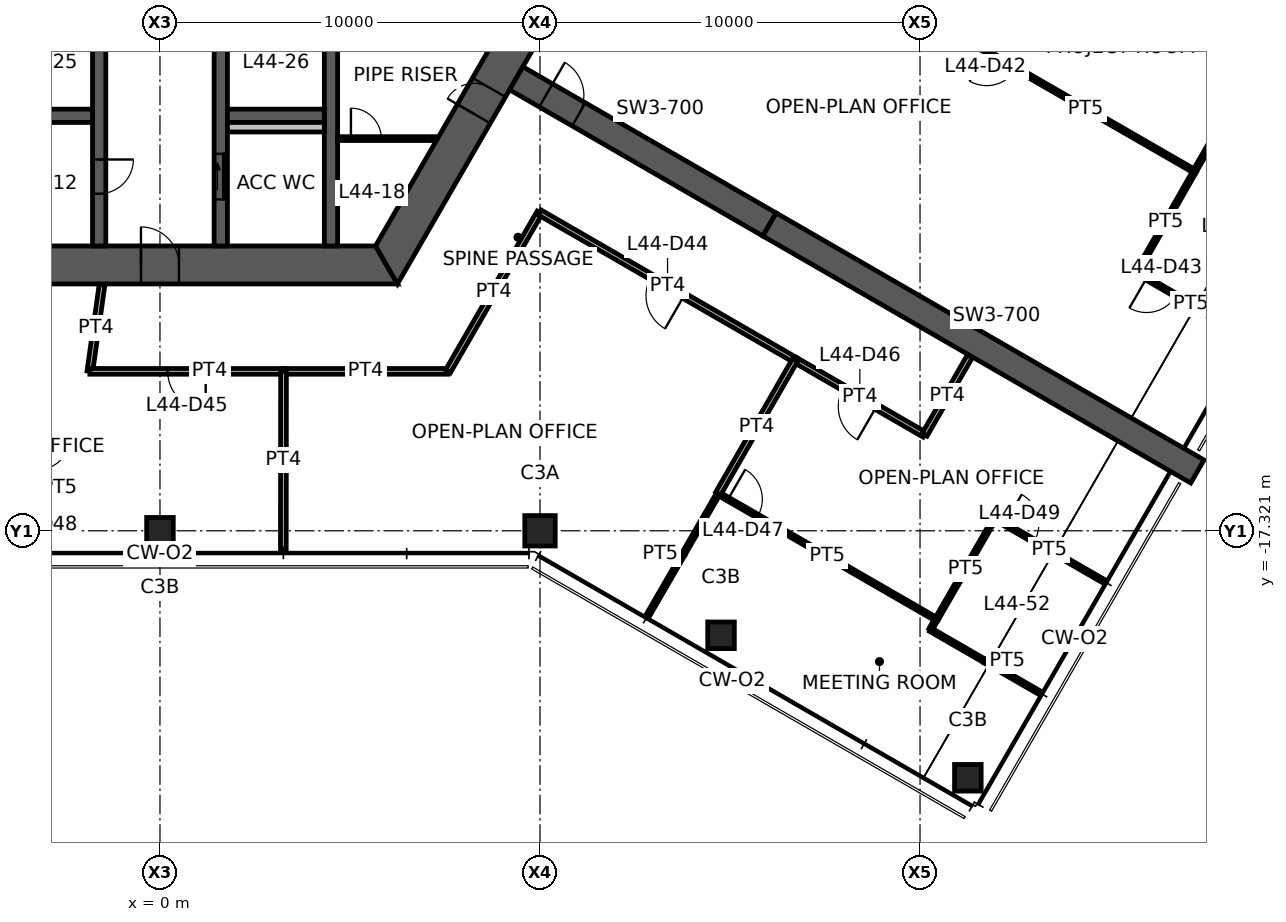
"""IFC4 building model, lengths in metres.
Left out: names, types, materials, properties, quantities, classifications, styles, units other than length and angle.
Written with IfcOpenShell. Run it as: python <this file> out.ifc"""

import sys

from ifc_helpers import new_model, si_unit, direction, frame, frame_2d, origin, origin_2d, place, context, subcontext, project, spatial, polyline, rectangle, hollow_rectangle, outline, extrude, element, fill, save


model = new_model("IFC4")
c1 = context("Model", 3, precision=1e-05, world=origin(), true_north=direction((0.0, 1.0)))
c2 = subcontext(c1, "Body", "Model", "MODEL_VIEW")
j1 = project(units=[si_unit("LENGTHUNIT", "METRE"), si_unit("PLANEANGLEUNIT", "RADIAN")], contexts=[c1])
p1 = place(None, origin())
s1 = spatial("IfcSite", under=j1, at=p1, CompositionType="ELEMENT")
p2 = place(p1, origin())
s2 = spatial("IfcBuilding", under=s1, at=p2, CompositionType="ELEMENT")
p3 = place(p2, frame((0.0, 0.0, 176.0)))
s3 = spatial("IfcBuildingStorey", under=s2, at=p3, CompositionType="ELEMENT", Elevation=176.0)
p4 = place(p3, frame((10.0, -17.321, 0.0), z_axis=(0.0, 0.0, 1.0), x_axis=(1.0, 0.0, 0.0)))
e1 = element("IfcColumn", 1, at=p4, inside=s3, PredefinedType="COLUMN", context=c2, shape_type="SweptSolid", body=[
    extrude(hollow_rectangle(XDim=0.8, YDim=0.8, WallThickness=0.045, at=origin_2d()), origin(), (0.0, 0.0, 1.0), 3.9),
])
for number, where, z_axis, x_axis in (
    (2, (0.0, -17.321, 0.0), (0.0, 0.0, 1.0), (1.0, 0.0, 0.0)),
    (3, (14.763, -20.071, 0.0), (0.0, 0.0, 1.0), (1.0, 0.0, 0.0)),
    (4, (21.258, -23.821, 0.0), (0.0, 0.0, 1.0), (1.0, 0.0, 0.0)),
):
    element("IfcColumn", number, at=place(p3, frame(where, z_axis=z_axis, x_axis=x_axis)), inside=s3, PredefinedType="COLUMN", context=c2, shape_type="SweptSolid", body=[
        extrude(hollow_rectangle(XDim=0.7, YDim=0.7, WallThickness=0.036, at=origin_2d()), origin(), (0.0, 0.0, 1.0), 3.9),
    ])
p5 = place(p3, frame((-5.961, -10.325, 0.0), z_axis=(0.0, 0.0, 1.0), x_axis=(1.0, 0.0, 0.0)))
e5 = element("IfcWall", 5, at=p5, inside=s3, PredefinedType="SHEAR", context=c2, shape_type="SweptSolid", body=[
    extrude(outline(polyline([(-0.289, -0.5), (5.461, -0.5), (6.461, -0.5), (12.211, -0.5), (11.634, 0.5), (6.461, 0.5), (5.461, 0.5), (0.289, 0.5), (-0.289, -0.5)])), origin(), (0.0, 0.0, 1.0), 3.9),
])
p6 = place(p5, frame((5.461, 0.0, 0.0)))
e6 = element("IfcOpeningElement", 6, at=p6, cuts=e5, PredefinedType="OPENING", context=c2, shape_type="SweptSolid", body=[
    extrude(rectangle(XDim=1.0, YDim=2.1, at=frame_2d((0.5, 1.05))), frame((0.0, 0.51, 0.0), z_axis=(0.0, -1.0, 0.0), x_axis=(1.0, 0.0, 0.0)), (0.0, 0.0, 1.0), 1.02),
])
p7 = place(p3, frame((5.961, -10.325, 0.0), z_axis=(0.0, 0.0, 1.0), x_axis=(0.500004296715, 0.866022923061, 0.0)))
e7 = element("IfcWall", 7, at=p7, inside=s3, PredefinedType="SHEAR", context=c2, shape_type="SweptSolid", body=[
    extrude(outline(polyline([(-0.289, -0.5), (4.594, -0.5), (5.394, -0.5), (12.211, -0.5), (11.634, 0.5), (5.394, 0.5), (4.594, 0.5), (0.289, 0.5), (-0.289, -0.5)])), origin(), (0.0, 0.0, 1.0), 3.9),
])
p8 = place(p7, frame((4.594, 0.0, 0.0)))
e8 = element("IfcOpeningElement", 8, at=p8, cuts=e7, PredefinedType="OPENING", context=c2, shape_type="SweptSolid", body=[
    extrude(rectangle(XDim=0.8, YDim=2.1, at=frame_2d((0.4, 1.05))), frame((0.0, 0.51, 0.0), z_axis=(0.0, -1.0, 0.0), x_axis=(1.0, 0.0, 0.0)), (0.0, 0.0, 1.0), 1.02),
])
p9 = place(p3, frame((9.375, -5.413, 0.0), z_axis=(0.0, 0.0, 1.0), x_axis=(0.866032377459, -0.499987921047, 0.0)))
e9 = element("IfcWall", 9, at=p9, inside=s3, PredefinedType="SHEAR", context=c2, shape_type="SweptSolid", body=[
    extrude(rectangle(XDim=7.696, YDim=0.7, at=frame_2d((3.848, 0.0))), origin(), (0.0, 0.0, 1.0), 3.9),
])
p10 = place(p9, frame((0.9, 0.0, 0.0)))
e10 = element("IfcOpeningElement", 10, at=p10, cuts=e9, PredefinedType="OPENING", context=c2, shape_type="SweptSolid", body=[
    extrude(rectangle(XDim=1.0, YDim=2.1, at=frame_2d((0.5, 1.05))), frame((0.0, 0.36, 0.0), z_axis=(0.0, -1.0, 0.0), x_axis=(1.0, 0.0, 0.0)), (0.0, 0.0, 1.0), 0.72),
])
p11 = place(p3, frame((16.039, -9.26, 0.0), z_axis=(0.0, 0.0, 1.0), x_axis=(0.866024837091, -0.50000098154, 0.0)))
e11 = element("IfcWall", 11, at=p11, inside=s3, PredefinedType="SHEAR", context=c2, shape_type="SweptSolid", body=[
    extrude(rectangle(XDim=13.0, YDim=0.7, at=frame_2d((6.5, 0.0))), origin(), (0.0, 0.0, 1.0), 3.9),
])
p12 = place(p3, frame((-1.6, -3.775, 0.0), z_axis=(0.0, 0.0, 1.0), x_axis=(0.0, -1.0, 0.0)))
e12 = element("IfcWall", 12, at=p12, inside=s3, PredefinedType="SHEAR", context=c2, shape_type="SweptSolid", body=[
    extrude(rectangle(XDim=6.05, YDim=0.35, at=frame_2d((3.025, 0.0))), origin(), (0.0, 0.0, 1.0), 3.9),
])
p13 = place(p12, frame((3.775, 0.0, 0.0)))
e13 = element("IfcOpeningElement", 13, at=p13, cuts=e12, PredefinedType="OPENING", context=c2, shape_type="SweptSolid", body=[
    extrude(rectangle(XDim=0.9, YDim=2.1, at=frame_2d((0.45, 1.05))), frame((0.0, 0.185, 0.0), z_axis=(0.0, -1.0, 0.0), x_axis=(1.0, 0.0, 0.0)), (0.0, 0.0, 1.0), 0.37),
])
p14 = place(p3, frame((1.6, -3.775, 0.0), z_axis=(0.0, 0.0, 1.0), x_axis=(0.0, -1.0, 0.0)))
e14 = element("IfcWall", 14, at=p14, inside=s3, PredefinedType="SHEAR", context=c2, shape_type="SweptSolid", body=[
    extrude(rectangle(XDim=6.05, YDim=0.35, at=frame_2d((3.025, 0.0))), origin(), (0.0, 0.0, 1.0), 3.9),
])
p15 = place(p14, frame((3.625, 0.0, 0.0)))
e15 = element("IfcOpeningElement", 15, at=p15, cuts=e14, PredefinedType="OPENING", context=c2, shape_type="SweptSolid", body=[
    extrude(rectangle(XDim=1.2, YDim=2.1, at=frame_2d((0.6, 1.05))), frame((0.0, 0.185, 0.0), z_axis=(0.0, -1.0, 0.0), x_axis=(1.0, 0.0, 0.0)), (0.0, 0.0, 1.0), 0.37),
])
p16 = place(p3, frame((4.5, -3.775, 0.0), z_axis=(0.0, 0.0, 1.0), x_axis=(0.0, -1.0, 0.0)))
e16 = element("IfcWall", 16, at=p16, inside=s3, PredefinedType="SHEAR", context=c2, shape_type="SweptSolid", body=[
    extrude(rectangle(XDim=6.05, YDim=0.35, at=frame_2d((3.025, 0.0))), origin(), (0.0, 0.0, 1.0), 3.9),
])
for number, where, z_axis, x_axis in (
    (17, (-4.325, -6.4, 0.0), (0.0, 0.0, 1.0), (1.0, 0.0, 0.0)),
    (18, (1.775, -6.4, 0.0), (0.0, 0.0, 1.0), (1.0, 0.0, 0.0)),
):
    element("IfcWall", number, at=place(p3, frame(where, z_axis=z_axis, x_axis=x_axis)), inside=s3, PredefinedType="SHEAR", context=c2, shape_type="SweptSolid", body=[
        extrude(rectangle(XDim=2.55, YDim=0.35, at=frame_2d((1.275, 0.0))), origin(), (0.0, 0.0, 1.0), 3.9),
    ])
p17 = place(p3, frame((1.775, -6.7, 0.0), z_axis=(0.0, 0.0, 1.0), x_axis=(1.0, 0.0, 0.0)))
e19 = element("IfcWall", 19, at=p17, inside=s3, PredefinedType="PLUMBINGWALL", context=c2, shape_type="SweptSolid", body=[
    extrude(rectangle(XDim=2.55, YDim=0.25, at=frame_2d((1.275, 0.0))), origin(), (0.0, 0.0, 1.0), 3.9),
])
p18 = place(p3, frame((4.675, -7.0, 0.0), z_axis=(0.0, 0.0, 1.0), x_axis=(1.0, 0.0, 0.0)))
e20 = element("IfcWall", 20, at=p18, inside=s3, PredefinedType="PARTITIONING", context=c2, shape_type="SweptSolid", body=[
    extrude(outline(polyline([(0.0, -0.05), (0.35, -0.05), (1.15, -0.05), (2.6, -0.05), (2.628, 0.0), (2.634, 0.05), (1.15, 0.05), (0.35, 0.05), (0.0, 0.05), (0.0, -0.05)])), origin(), (0.0, 0.0, 1.0), 2.95),
])
p19 = place(p18, frame((0.35, 0.0, 0.0)))
e21 = element("IfcOpeningElement", 21, at=p19, cuts=e20, PredefinedType="OPENING", context=c2, shape_type="SweptSolid", body=[
    extrude(rectangle(XDim=0.8, YDim=2.1, at=frame_2d((0.4, 1.05))), frame((0.0, 0.06, 0.0), z_axis=(0.0, -1.0, 0.0), x_axis=(1.0, 0.0, 0.0)), (0.0, 0.0, 1.0), 0.12),
])
p20 = place(p3, frame((29.077, -4.658, 0.0), z_axis=(0.0, 0.0, 1.0), x_axis=(-0.501275229052, -0.865287897026, 0.0)))
e22 = element("IfcWall", 22, at=p20, inside=s3, PredefinedType="PARTITIONING", context=c2, shape_type="SweptSolid", body=[
    extrude(rectangle(XDim=3.705, YDim=0.1, at=frame_2d((1.853, 0.0))), origin(), (0.0, 0.0, 1.0), 2.95),
])
p21 = place(p3, frame((27.227, -7.863, 0.0), z_axis=(0.0, 0.0, 1.0), x_axis=(-0.866343956507, 0.499447844147, 0.0)))
e23 = element("IfcWall", 23, at=p21, inside=s3, PredefinedType="PARTITIONING", context=c2, shape_type="SweptSolid", body=[
    extrude(rectangle(XDim=6.62, YDim=0.1, at=frame_2d((3.31, 0.0))), origin(), (0.0, 0.0, 1.0), 2.95),
])
p22 = place(p21, frame((5.42, 0.0, 0.0)))
e24 = element("IfcOpeningElement", 24, at=p22, cuts=e23, PredefinedType="OPENING", context=c2, shape_type="SweptSolid", body=[
    extrude(rectangle(XDim=0.9, YDim=2.1, at=frame_2d((0.45, 1.05))), frame((0.0, 0.06, 0.0), z_axis=(0.0, -1.0, 0.0), x_axis=(1.0, 0.0, 0.0)), (0.0, 0.0, 1.0), 0.12),
])
p23 = place(p3, frame((25.7, -10.527, 0.0), z_axis=(0.0, 0.0, 1.0), x_axis=(0.497097650811, 0.867694603855, 0.0)))
e25 = element("IfcWall", 25, at=p23, inside=s3, PredefinedType="PARTITIONING", context=c2, shape_type="SweptSolid", body=[
    extrude(rectangle(XDim=3.071, YDim=0.1, at=frame_2d((1.535, 0.0))), origin(), (0.0, 0.0, 1.0), 2.95),
])
p24 = place(p3, frame((28.562, -12.18, 0.0), z_axis=(0.0, 0.0, 1.0), x_axis=(-0.866020751647, 0.500008057651, 0.0)))
e26 = element("IfcWall", 26, at=p24, inside=s3, PredefinedType="PARTITIONING", context=c2, shape_type="SweptSolid", body=[
    extrude(rectangle(XDim=3.305, YDim=0.1, at=frame_2d((1.653, 0.0))), origin(), (0.0, 0.0, 1.0), 2.95),
])
p25 = place(p24, frame((2.105, 0.0, 0.0)))
e27 = element("IfcOpeningElement", 27, at=p25, cuts=e26, PredefinedType="OPENING", context=c2, shape_type="SweptSolid", body=[
    extrude(rectangle(XDim=0.9, YDim=2.1, at=frame_2d((0.45, 1.05))), frame((0.0, 0.06, 0.0), z_axis=(0.0, -1.0, 0.0), x_axis=(1.0, 0.0, 0.0)), (0.0, 0.0, 1.0), 0.12),
])
p26 = place(p3, frame((7.578, -13.125, 0.0), z_axis=(0.0, 0.0, 1.0), x_axis=(-1.0, 0.0, 0.0)))
e28 = element("IfcWall", 28, at=p26, inside=s3, PredefinedType="PARTITIONING", context=c2, shape_type="SweptSolid", body=[
    extrude(rectangle(XDim=4.336, YDim=0.15, at=frame_2d((2.168, 0.0))), origin(), (0.0, 0.0, 1.0), 2.95),
])
p27 = place(p3, frame((9.992, -8.944, 0.0), z_axis=(0.0, 0.0, 1.0), x_axis=(-0.500033248206, -0.866006207073, 0.0)))
e29 = element("IfcWall", 29, at=p27, inside=s3, PredefinedType="PARTITIONING", context=c2, shape_type="SweptSolid", body=[
    extrude(rectangle(XDim=4.828, YDim=0.15, at=frame_2d((2.414, 0.0))), origin(), (0.0, 0.0, 1.0), 2.95),
])
p28 = place(p3, frame((16.721, -12.83, 0.0), z_axis=(0.0, 0.0, 1.0), x_axis=(-0.866020780657, 0.500008007406, 0.0)))
e30 = element("IfcWall", 30, at=p28, inside=s3, PredefinedType="PARTITIONING", context=c2, shape_type="SweptSolid", body=[
    extrude(rectangle(XDim=7.771, YDim=0.15, at=frame_2d((3.885, 0.0))), origin(), (0.0, 0.0, 1.0), 2.95),
])
p29 = place(p28, frame((3.385, 0.0, 0.0)))
e31 = element("IfcOpeningElement", 31, at=p29, cuts=e30, PredefinedType="OPENING", context=c2, shape_type="SweptSolid", body=[
    extrude(rectangle(XDim=1.0, YDim=2.1, at=frame_2d((0.5, 1.05))), frame((0.0, 0.085, 0.0), z_axis=(0.0, -1.0, 0.0), x_axis=(1.0, 0.0, 0.0)), (0.0, 0.0, 1.0), 0.17),
])
p30 = place(p3, frame((-1.844, -13.125, 0.0), z_axis=(0.0, 0.0, 1.0), x_axis=(0.139119980631, 0.990275532864, 0.0)))
e32 = element("IfcWall", 32, at=p30, inside=s3, PredefinedType="PARTITIONING", context=c2, shape_type="SweptSolid", body=[
    extrude(rectangle(XDim=2.302, YDim=0.15, at=frame_2d((1.151, 0.0))), origin(), (0.0, 0.0, 1.0), 2.95),
])
p31 = place(p3, frame((3.251, -13.125, 0.0), z_axis=(0.0, 0.0, 1.0), x_axis=(-1.0, 0.0, 0.0)))
e33 = element("IfcWall", 33, at=p31, inside=s3, PredefinedType="PARTITIONING", context=c2, shape_type="SweptSolid", body=[
    extrude(rectangle(XDim=5.096, YDim=0.15, at=frame_2d((2.548, 0.0))), origin(), (0.0, 0.0, 1.0), 2.95),
])
p32 = place(p31, frame((2.048, 0.0, 0.0)))
e34 = element("IfcOpeningElement", 34, at=p32, cuts=e33, PredefinedType="OPENING", context=c2, shape_type="SweptSolid", body=[
    extrude(rectangle(XDim=1.0, YDim=2.1, at=frame_2d((0.5, 1.05))), frame((0.0, 0.085, 0.0), z_axis=(0.0, -1.0, 0.0), x_axis=(1.0, 0.0, 0.0)), (0.0, 0.0, 1.0), 0.17),
])
p33 = place(p3, frame((20.12, -14.792, 0.0), z_axis=(0.0, 0.0, 1.0), x_axis=(-0.866038848349, 0.499976712608, 0.0)))
e35 = element("IfcWall", 35, at=p33, inside=s3, PredefinedType="PARTITIONING", context=c2, shape_type="SweptSolid", body=[
    extrude(rectangle(XDim=3.934, YDim=0.15, at=frame_2d((1.967, 0.0))), origin(), (0.0, 0.0, 1.0), 2.95),
])
p34 = place(p33, frame((1.467, 0.0, 0.0)))
e36 = element("IfcOpeningElement", 36, at=p34, cuts=e35, PredefinedType="OPENING", context=c2, shape_type="SweptSolid", body=[
    extrude(rectangle(XDim=1.0, YDim=2.1, at=frame_2d((0.5, 1.05))), frame((0.0, 0.085, 0.0), z_axis=(0.0, -1.0, 0.0), x_axis=(1.0, 0.0, 0.0)), (0.0, 0.0, 1.0), 0.17),
])
p35 = place(p3, frame((21.31, -12.731, 0.0), z_axis=(0.0, 0.0, 1.0), x_axis=(-0.500077627542, -0.865980580863, 0.0)))
e37 = element("IfcWall", 37, at=p35, inside=s3, PredefinedType="PARTITIONING", context=c2, shape_type="SweptSolid", body=[
    extrude(rectangle(XDim=2.38, YDim=0.15, at=frame_2d((1.19, 0.0))), origin(), (0.0, 0.0, 1.0), 2.95),
])
p36 = place(p3, frame((20.275, -19.924, 0.0), z_axis=(0.0, 0.0, 1.0), x_axis=(0.86598972202, -0.500061797536, 0.0)))
e38 = element("IfcWall", 38, at=p36, inside=s3, PredefinedType="PARTITIONING", context=c2, shape_type="SweptSolid", body=[
    extrude(rectangle(XDim=3.28, YDim=0.1, at=frame_2d((1.64, 0.0))), origin(), (0.0, 0.0, 1.0), 2.95),
])
p37 = place(p3, frame((20.43, -19.646, 0.0), z_axis=(0.0, 0.0, 1.0), x_axis=(-0.486425680342, -0.873721956634, 0.0)))
e39 = element("IfcWall", 39, at=p37, inside=s3, PredefinedType="PARTITIONING", context=c2, shape_type="SweptSolid", body=[
    extrude(rectangle(XDim=0.318, YDim=0.1, at=frame_2d((0.159, 0.0))), origin(), (0.0, 0.0, 1.0), 2.95),
])
p38 = place(p3, frame((12.84, -19.543, 0.0), z_axis=(0.0, 0.0, 1.0), x_axis=(0.50111938689, 0.865378160161, 0.0)))
e40 = element("IfcWall", 40, at=p38, inside=s3, PredefinedType="PARTITIONING", context=c2, shape_type="SweptSolid", body=[
    extrude(rectangle(XDim=3.705, YDim=0.1, at=frame_2d((1.853, 0.0))), origin(), (0.0, 0.0, 1.0), 2.95),
])
p39 = place(p3, frame((14.69, -16.338, 0.0), z_axis=(0.0, 0.0, 1.0), x_axis=(0.866056800938, -0.499945614591, 0.0)))
e41 = element("IfcWall", 41, at=p39, inside=s3, PredefinedType="PARTITIONING", context=c2, shape_type="SweptSolid", body=[
    extrude(rectangle(XDim=6.629, YDim=0.1, at=frame_2d((3.314, 0.0))), origin(), (0.0, 0.0, 1.0), 2.95),
])
p40 = place(p39, frame((0.3, 0.0, 0.0)))
e42 = element("IfcOpeningElement", 42, at=p40, cuts=e41, PredefinedType="OPENING", context=c2, shape_type="SweptSolid", body=[
    extrude(rectangle(XDim=0.9, YDim=2.1, at=frame_2d((0.45, 1.05))), frame((0.0, 0.06, 0.0), z_axis=(0.0, -1.0, 0.0), x_axis=(1.0, 0.0, 0.0)), (0.0, 0.0, 1.0), 0.12),
])
p41 = place(p3, frame((20.431, -19.653, 0.0), z_axis=(0.0, 0.0, 1.0), x_axis=(0.500029867204, 0.86600815926, 0.0)))
e43 = element("IfcWall", 43, at=p41, inside=s3, PredefinedType="PARTITIONING", context=c2, shape_type="SweptSolid", body=[
    extrude(rectangle(XDim=3.071, YDim=0.1, at=frame_2d((1.535, 0.0))), origin(), (0.0, 0.0, 1.0), 2.95),
])
p42 = place(p3, frame((21.967, -16.993, 0.0), z_axis=(0.0, 0.0, 1.0), x_axis=(0.866020751647, -0.500008057651, 0.0)))
e44 = element("IfcWall", 44, at=p42, inside=s3, PredefinedType="PARTITIONING", context=c2, shape_type="SweptSolid", body=[
    extrude(rectangle(XDim=3.305, YDim=0.1, at=frame_2d((1.653, 0.0))), origin(), (0.0, 0.0, 1.0), 2.95),
])
p43 = place(p42, frame((0.3, 0.0, 0.0)))
e45 = element("IfcOpeningElement", 45, at=p43, cuts=e44, PredefinedType="OPENING", context=c2, shape_type="SweptSolid", body=[
    extrude(rectangle(XDim=0.9, YDim=2.1, at=frame_2d((0.45, 1.05))), frame((0.0, 0.06, 0.0), z_axis=(0.0, -1.0, 0.0), x_axis=(1.0, 0.0, 0.0)), (0.0, 0.0, 1.0), 0.12),
])
p44 = place(p3, frame((3.246, -17.801, 0.0), z_axis=(0.0, 0.0, 1.0), x_axis=(0.001096662352, 0.999999398666, 0.0)))
e46 = element("IfcWall", 46, at=p44, inside=s3, PredefinedType="PARTITIONING", context=c2, shape_type="SweptSolid", body=[
    extrude(rectangle(XDim=4.675, YDim=0.15, at=frame_2d((2.337, 0.0))), origin(), (0.0, 0.0, 1.0), 2.95),
])
p45 = place(p3, frame((16.713, -12.825, 0.0), z_axis=(0.0, 0.0, 1.0), x_axis=(-0.498976779382, -0.866615355067, 0.0)))
e47 = element("IfcWall", 47, at=p45, inside=s3, PredefinedType="PARTITIONING", context=c2, shape_type="SweptSolid", body=[
    extrude(rectangle(XDim=4.054, YDim=0.15, at=frame_2d((2.027, 0.0))), origin(), (0.0, 0.0, 1.0), 2.95),
])
p46 = place(p6, origin())
e48 = element("IfcDoor", 48, at=p46, inside=s3, OperationType="SINGLE_SWING_LEFT", PredefinedType="DOOR", context=c2, shape_type="SweptSolid", body=[
    extrude(rectangle(XDim=1.0, YDim=2.1, at=frame_2d((0.5, 1.05))), frame((0.0, 0.025, 0.0), z_axis=(0.0, -1.0, 0.0), x_axis=(1.0, 0.0, 0.0)), (0.0, 0.0, 1.0), 0.05),
])
fill(e6, e48)
p47 = place(p8, origin())
e49 = element("IfcDoor", 49, at=p47, inside=s3, OperationType="SINGLE_SWING_LEFT", PredefinedType="DOOR", context=c2, shape_type="SweptSolid", body=[
    extrude(rectangle(XDim=0.8, YDim=2.1, at=frame_2d((0.4, 1.05))), frame((0.0, 0.025, 0.0), z_axis=(0.0, -1.0, 0.0), x_axis=(1.0, 0.0, 0.0)), (0.0, 0.0, 1.0), 0.05),
])
fill(e8, e49)
p48 = place(p15, origin())
e50 = element("IfcDoor", 50, at=p48, inside=s3, OperationType="SLIDING_TO_LEFT", PredefinedType="DOOR", context=c2, shape_type="SweptSolid", body=[
    extrude(rectangle(XDim=1.2, YDim=2.1, at=frame_2d((0.6, 1.05))), frame((0.0, 0.025, 0.0), z_axis=(0.0, -1.0, 0.0), x_axis=(1.0, 0.0, 0.0)), (0.0, 0.0, 1.0), 0.05),
])
fill(e15, e50)
p49 = place(p13, origin())
e51 = element("IfcDoor", 51, at=p49, inside=s3, OperationType="SINGLE_SWING_LEFT", PredefinedType="DOOR", context=c2, shape_type="SweptSolid", body=[
    extrude(rectangle(XDim=0.9, YDim=2.1, at=frame_2d((0.45, 1.05))), frame((0.0, 0.025, 0.0), z_axis=(0.0, -1.0, 0.0), x_axis=(1.0, 0.0, 0.0)), (0.0, 0.0, 1.0), 0.05),
])
fill(e13, e51)
p50 = place(p10, origin())
e52 = element("IfcDoor", 52, at=p50, inside=s3, OperationType="SINGLE_SWING_LEFT", PredefinedType="DOOR", context=c2, shape_type="SweptSolid", body=[
    extrude(rectangle(XDim=1.0, YDim=2.1, at=frame_2d((0.5, 1.05))), frame((0.0, 0.025, 0.0), z_axis=(0.0, -1.0, 0.0), x_axis=(1.0, 0.0, 0.0)), (0.0, 0.0, 1.0), 0.05),
])
fill(e10, e52)
p51 = place(p19, origin())
e53 = element("IfcDoor", 53, at=p51, inside=s3, OperationType="SINGLE_SWING_LEFT", PredefinedType="DOOR", context=c2, shape_type="SweptSolid", body=[
    extrude(rectangle(XDim=0.8, YDim=2.1, at=frame_2d((0.4, 1.05))), frame((0.0, 0.025, 0.0), z_axis=(0.0, -1.0, 0.0), x_axis=(1.0, 0.0, 0.0)), (0.0, 0.0, 1.0), 0.05),
])
fill(e21, e53)
p52 = place(p22, origin())
e54 = element("IfcDoor", 54, at=p52, inside=s3, OperationType="SINGLE_SWING_RIGHT", PredefinedType="DOOR", context=c2, shape_type="SweptSolid", body=[
    extrude(rectangle(XDim=0.9, YDim=2.1, at=frame_2d((0.45, 1.05))), frame((0.0, 0.025, 0.0), z_axis=(0.0, -1.0, 0.0), x_axis=(1.0, 0.0, 0.0)), (0.0, 0.0, 1.0), 0.05),
])
fill(e24, e54)
p53 = place(p25, origin())
e55 = element("IfcDoor", 55, at=p53, inside=s3, OperationType="SINGLE_SWING_RIGHT", PredefinedType="DOOR", context=c2, shape_type="SweptSolid", body=[
    extrude(rectangle(XDim=0.9, YDim=2.1, at=frame_2d((0.45, 1.05))), frame((0.0, 0.025, 0.0), z_axis=(0.0, -1.0, 0.0), x_axis=(1.0, 0.0, 0.0)), (0.0, 0.0, 1.0), 0.05),
])
fill(e27, e55)
p54 = place(p29, origin())
e56 = element("IfcDoor", 56, at=p54, inside=s3, OperationType="SINGLE_SWING_LEFT", PredefinedType="DOOR", context=c2, shape_type="SweptSolid", body=[
    extrude(rectangle(XDim=1.0, YDim=2.1, at=frame_2d((0.5, 1.05))), frame((0.0, 0.025, 0.0), z_axis=(0.0, -1.0, 0.0), x_axis=(1.0, 0.0, 0.0)), (0.0, 0.0, 1.0), 0.05),
])
fill(e31, e56)
p55 = place(p32, origin())
e57 = element("IfcDoor", 57, at=p55, inside=s3, OperationType="SINGLE_SWING_LEFT", PredefinedType="DOOR", context=c2, shape_type="SweptSolid", body=[
    extrude(rectangle(XDim=1.0, YDim=2.1, at=frame_2d((0.5, 1.05))), frame((0.0, 0.025, 0.0), z_axis=(0.0, -1.0, 0.0), x_axis=(1.0, 0.0, 0.0)), (0.0, 0.0, 1.0), 0.05),
])
fill(e34, e57)
p56 = place(p34, origin())
e58 = element("IfcDoor", 58, at=p56, inside=s3, OperationType="SINGLE_SWING_LEFT", PredefinedType="DOOR", context=c2, shape_type="SweptSolid", body=[
    extrude(rectangle(XDim=1.0, YDim=2.1, at=frame_2d((0.5, 1.05))), frame((0.0, 0.025, 0.0), z_axis=(0.0, -1.0, 0.0), x_axis=(1.0, 0.0, 0.0)), (0.0, 0.0, 1.0), 0.05),
])
fill(e36, e58)
p57 = place(p40, origin())
e59 = element("IfcDoor", 59, at=p57, inside=s3, OperationType="SINGLE_SWING_LEFT", PredefinedType="DOOR", context=c2, shape_type="SweptSolid", body=[
    extrude(rectangle(XDim=0.9, YDim=2.1, at=frame_2d((0.45, 1.05))), frame((0.0, 0.025, 0.0), z_axis=(0.0, -1.0, 0.0), x_axis=(1.0, 0.0, 0.0)), (0.0, 0.0, 1.0), 0.05),
])
fill(e42, e59)
p58 = place(p43, origin())
e60 = element("IfcDoor", 60, at=p58, inside=s3, OperationType="SINGLE_SWING_LEFT", PredefinedType="DOOR", context=c2, shape_type="SweptSolid", body=[
    extrude(rectangle(XDim=0.9, YDim=2.1, at=frame_2d((0.45, 1.05))), frame((0.0, 0.025, 0.0), z_axis=(0.0, -1.0, 0.0), x_axis=(1.0, 0.0, 0.0)), (0.0, 0.0, 1.0), 0.05),
])
fill(e45, e60)
save(model, sys.argv[1])
